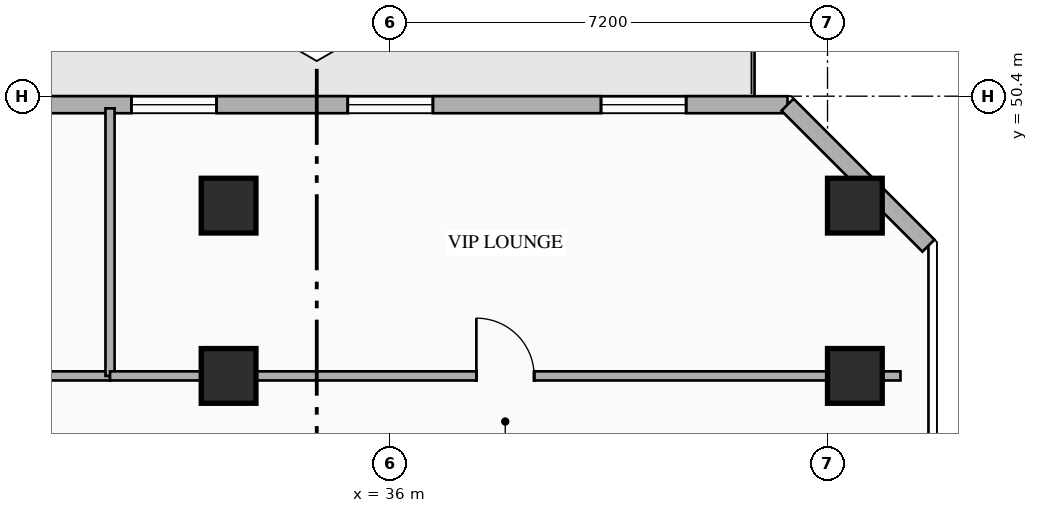
"""IFC4 building model, lengths in metres.
Left out: names, types, materials, properties, quantities, classifications, styles, units other than length and angle.
Written with IfcOpenShell. Run it as: python <this file> out.ifc"""

import sys

from ifc_helpers import new_model, si_unit, direction, frame, frame_2d, origin, origin_2d, place, context, subcontext, project, spatial, rectangle, hollow_rectangle, extrude, element, fill, save


model = new_model("IFC4")
c1 = context("Model", 3, precision=1e-05, world=origin(), true_north=direction((0.0, 1.0)))
c2 = subcontext(c1, "Body", "Model", "MODEL_VIEW")
j1 = project(units=[si_unit("LENGTHUNIT", "METRE"), si_unit("PLANEANGLEUNIT", "RADIAN")], contexts=[c1])
p1 = place(None, origin())
s1 = spatial("IfcSite", under=j1, at=p1, CompositionType="ELEMENT")
p2 = place(p1, origin())
s2 = spatial("IfcBuilding", under=s1, at=p2, CompositionType="ELEMENT")
p3 = place(p2, frame((0.0, 0.0, 74.6)))
s3 = spatial("IfcBuildingStorey", under=s2, at=p3, CompositionType="ELEMENT", Elevation=74.6)
for number, where, z_axis, x_axis in (
    (1, (33.35, 45.8, 0.0), (0.0, 0.0, 1.0), (1.0, 0.0, 0.0)),
    (2, (43.65, 45.8, 0.0), (0.0, 0.0, 1.0), (1.0, 0.0, 0.0)),
    (3, (33.35, 48.6, 0.0), (0.0, 0.0, 1.0), (1.0, 0.0, 0.0)),
    (4, (43.65, 48.6, 0.0), (0.0, 0.0, 1.0), (1.0, 0.0, 0.0)),
):
    element("IfcColumn", number, at=place(p3, frame(where, z_axis=z_axis, x_axis=x_axis)), inside=s3, PredefinedType="COLUMN", context=c2, shape_type="SweptSolid", body=[
        extrude(hollow_rectangle(XDim=0.9, YDim=0.9, WallThickness=0.036, at=origin_2d()), origin(), (0.0, 0.0, 1.0), 3.35),
    ])
p4 = place(p3, frame((12.058, 50.26, 0.0), z_axis=(0.0, 0.0, 1.0), x_axis=(1.0, 0.0, 0.0)))
e5 = element("IfcWall", 5, at=p4, inside=s3, PredefinedType="STANDARD", context=c2, shape_type="SweptSolid", body=[
    extrude(rectangle(XDim=30.484, YDim=0.28, at=frame_2d((15.242, 0.0))), origin(), (0.0, 0.0, 1.0), 3.13),
])
p5 = place(p4, frame((14.992, 0.0, 0.0)))
e6 = element("IfcOpeningElement", 6, at=p5, cuts=e5, PredefinedType="OPENING", context=c2, shape_type="SweptSolid", body=[
    extrude(rectangle(XDim=1.1, YDim=2.2, at=frame_2d((0.55, 1.1))), frame((0.0, 0.15, 0.0), z_axis=(0.0, -1.0, 0.0), x_axis=(1.0, 0.0, 0.0)), (0.0, 0.0, 1.0), 0.3),
])
p6 = place(p4, frame((0.46, 0.0, 0.85)))
e7 = element("IfcOpeningElement", 7, at=p6, cuts=e5, PredefinedType="OPENING", context=c2, shape_type="SweptSolid", body=[
    extrude(rectangle(XDim=1.4, YDim=1.8, at=frame_2d((0.7, 0.9))), frame((0.0, 0.15, 0.0), z_axis=(0.0, -1.0, 0.0), x_axis=(1.0, 0.0, 0.0)), (0.0, 0.0, 1.0), 0.3),
])
p7 = place(p4, frame((4.435, 0.0, 0.85)))
e8 = element("IfcOpeningElement", 8, at=p7, cuts=e5, PredefinedType="OPENING", context=c2, shape_type="SweptSolid", body=[
    extrude(rectangle(XDim=1.4, YDim=1.8, at=frame_2d((0.7, 0.9))), frame((0.0, 0.15, 0.0), z_axis=(0.0, -1.0, 0.0), x_axis=(1.0, 0.0, 0.0)), (0.0, 0.0, 1.0), 0.3),
])
p8 = place(p4, frame((11.361, 0.0, 0.85)))
e9 = element("IfcOpeningElement", 9, at=p8, cuts=e5, PredefinedType="OPENING", context=c2, shape_type="SweptSolid", body=[
    extrude(rectangle(XDim=1.4, YDim=1.8, at=frame_2d((0.7, 0.9))), frame((0.0, 0.15, 0.0), z_axis=(0.0, -1.0, 0.0), x_axis=(1.0, 0.0, 0.0)), (0.0, 0.0, 1.0), 0.3),
])
p9 = place(p4, frame((19.693, 0.0, 0.85)))
e10 = element("IfcOpeningElement", 10, at=p9, cuts=e5, PredefinedType="OPENING", context=c2, shape_type="SweptSolid", body=[
    extrude(rectangle(XDim=1.4, YDim=1.8, at=frame_2d((0.7, 0.9))), frame((0.0, 0.15, 0.0), z_axis=(0.0, -1.0, 0.0), x_axis=(1.0, 0.0, 0.0)), (0.0, 0.0, 1.0), 0.3),
])
p10 = place(p4, frame((23.252, 0.0, 0.85)))
e11 = element("IfcOpeningElement", 11, at=p10, cuts=e5, PredefinedType="OPENING", context=c2, shape_type="SweptSolid", body=[
    extrude(rectangle(XDim=1.4, YDim=1.8, at=frame_2d((0.7, 0.9))), frame((0.0, 0.15, 0.0), z_axis=(0.0, -1.0, 0.0), x_axis=(1.0, 0.0, 0.0)), (0.0, 0.0, 1.0), 0.3),
])
p11 = place(p4, frame((27.417, 0.0, 0.85)))
e12 = element("IfcOpeningElement", 12, at=p11, cuts=e5, PredefinedType="OPENING", context=c2, shape_type="SweptSolid", body=[
    extrude(rectangle(XDim=1.4, YDim=1.8, at=frame_2d((0.7, 0.9))), frame((0.0, 0.15, 0.0), z_axis=(0.0, -1.0, 0.0), x_axis=(1.0, 0.0, 0.0)), (0.0, 0.0, 1.0), 0.3),
])
p12 = place(p3, frame((42.542, 50.26, 0.0), z_axis=(0.0, 0.0, 1.0), x_axis=(0.707106781187, -0.707106781187, 0.0)))
e13 = element("IfcWall", 13, at=p12, inside=s3, PredefinedType="STANDARD", context=c2, shape_type="SweptSolid", body=[
    extrude(rectangle(XDim=3.278, YDim=0.28, at=frame_2d((1.639, 0.0))), origin(), (0.0, 0.0, 1.0), 3.13),
])
p13 = place(p3, frame((22.2, 45.8, 0.0), z_axis=(0.0, 0.0, 1.0), x_axis=(1.0, 0.0, 0.0)))
e14 = element("IfcWall", 14, at=p13, inside=s3, PredefinedType="PARTITIONING", context=c2, shape_type="SweptSolid", body=[
    extrude(rectangle(XDim=9.2, YDim=0.15, at=frame_2d((4.6, 0.0))), origin(), (0.0, 0.0, 1.0), 2.425),
])
p14 = place(p13, frame((5.248, 0.0, 0.0)))
e15 = element("IfcOpeningElement", 15, at=p14, cuts=e14, PredefinedType="OPENING", context=c2, shape_type="SweptSolid", body=[
    extrude(rectangle(XDim=0.95, YDim=2.15, at=frame_2d((0.475, 1.075))), frame((0.0, 0.085, 0.0), z_axis=(0.0, -1.0, 0.0), x_axis=(1.0, 0.0, 0.0)), (0.0, 0.0, 1.0), 0.17),
])
p15 = place(p3, frame((31.4, 45.8, 0.0), z_axis=(0.0, 0.0, 1.0), x_axis=(0.0, 1.0, 0.0)))
e16 = element("IfcWall", 16, at=p15, inside=s3, PredefinedType="PARTITIONING", context=c2, shape_type="SweptSolid", body=[
    extrude(rectangle(XDim=4.4, YDim=0.15, at=frame_2d((2.2, 0.0))), origin(), (0.0, 0.0, 1.0), 3.13),
])
p16 = place(p3, frame((31.4, 45.8, 0.0), z_axis=(0.0, 0.0, 1.0), x_axis=(1.0, 0.0, 0.0)))
e17 = element("IfcWall", 17, at=p16, inside=s3, PredefinedType="PARTITIONING", context=c2, shape_type="SweptSolid", body=[
    extrude(rectangle(XDim=13.0, YDim=0.15, at=frame_2d((6.5, 0.0))), origin(), (0.0, 0.0, 1.0), 2.425),
])
p17 = place(p16, frame((6.025, 0.0, 0.0)))
e18 = element("IfcOpeningElement", 18, at=p17, cuts=e17, PredefinedType="OPENING", context=c2, shape_type="SweptSolid", body=[
    extrude(rectangle(XDim=0.95, YDim=2.15, at=frame_2d((0.475, 1.075))), frame((0.0, 0.085, 0.0), z_axis=(0.0, -1.0, 0.0), x_axis=(1.0, 0.0, 0.0)), (0.0, 0.0, 1.0), 0.17),
])
p18 = place(p9, origin())
e19 = element("IfcWindow", 19, at=p18, inside=s3, PartitioningType="SINGLE_PANEL", PredefinedType="WINDOW", context=c2, shape_type="SweptSolid", body=[
    extrude(rectangle(XDim=1.4, YDim=1.8, at=frame_2d((0.7, 0.9))), frame((0.0, 0.03, 0.0), z_axis=(0.0, -1.0, 0.0), x_axis=(1.0, 0.0, 0.0)), (0.0, 0.0, 1.0), 0.06),
])
fill(e10, e19)
p19 = place(p10, origin())
e20 = element("IfcWindow", 20, at=p19, inside=s3, PartitioningType="SINGLE_PANEL", PredefinedType="WINDOW", context=c2, shape_type="SweptSolid", body=[
    extrude(rectangle(XDim=1.4, YDim=1.8, at=frame_2d((0.7, 0.9))), frame((0.0, 0.03, 0.0), z_axis=(0.0, -1.0, 0.0), x_axis=(1.0, 0.0, 0.0)), (0.0, 0.0, 1.0), 0.06),
])
fill(e11, e20)
p20 = place(p11, origin())
e21 = element("IfcWindow", 21, at=p20, inside=s3, PartitioningType="SINGLE_PANEL", PredefinedType="WINDOW", context=c2, shape_type="SweptSolid", body=[
    extrude(rectangle(XDim=1.4, YDim=1.8, at=frame_2d((0.7, 0.9))), frame((0.0, 0.03, 0.0), z_axis=(0.0, -1.0, 0.0), x_axis=(1.0, 0.0, 0.0)), (0.0, 0.0, 1.0), 0.06),
])
fill(e12, e21)
p21 = place(p17, origin())
e22 = element("IfcDoor", 22, at=p21, inside=s3, OperationType="SINGLE_SWING_LEFT", PredefinedType="DOOR", context=c2, shape_type="SweptSolid", body=[
    extrude(rectangle(XDim=0.95, YDim=2.15, at=frame_2d((0.475, 1.075))), frame((0.0, 0.025, 0.0), z_axis=(0.0, -1.0, 0.0), x_axis=(1.0, 0.0, 0.0)), (0.0, 0.0, 1.0), 0.05),
])
fill(e18, e22)
save(model, sys.argv[1])
